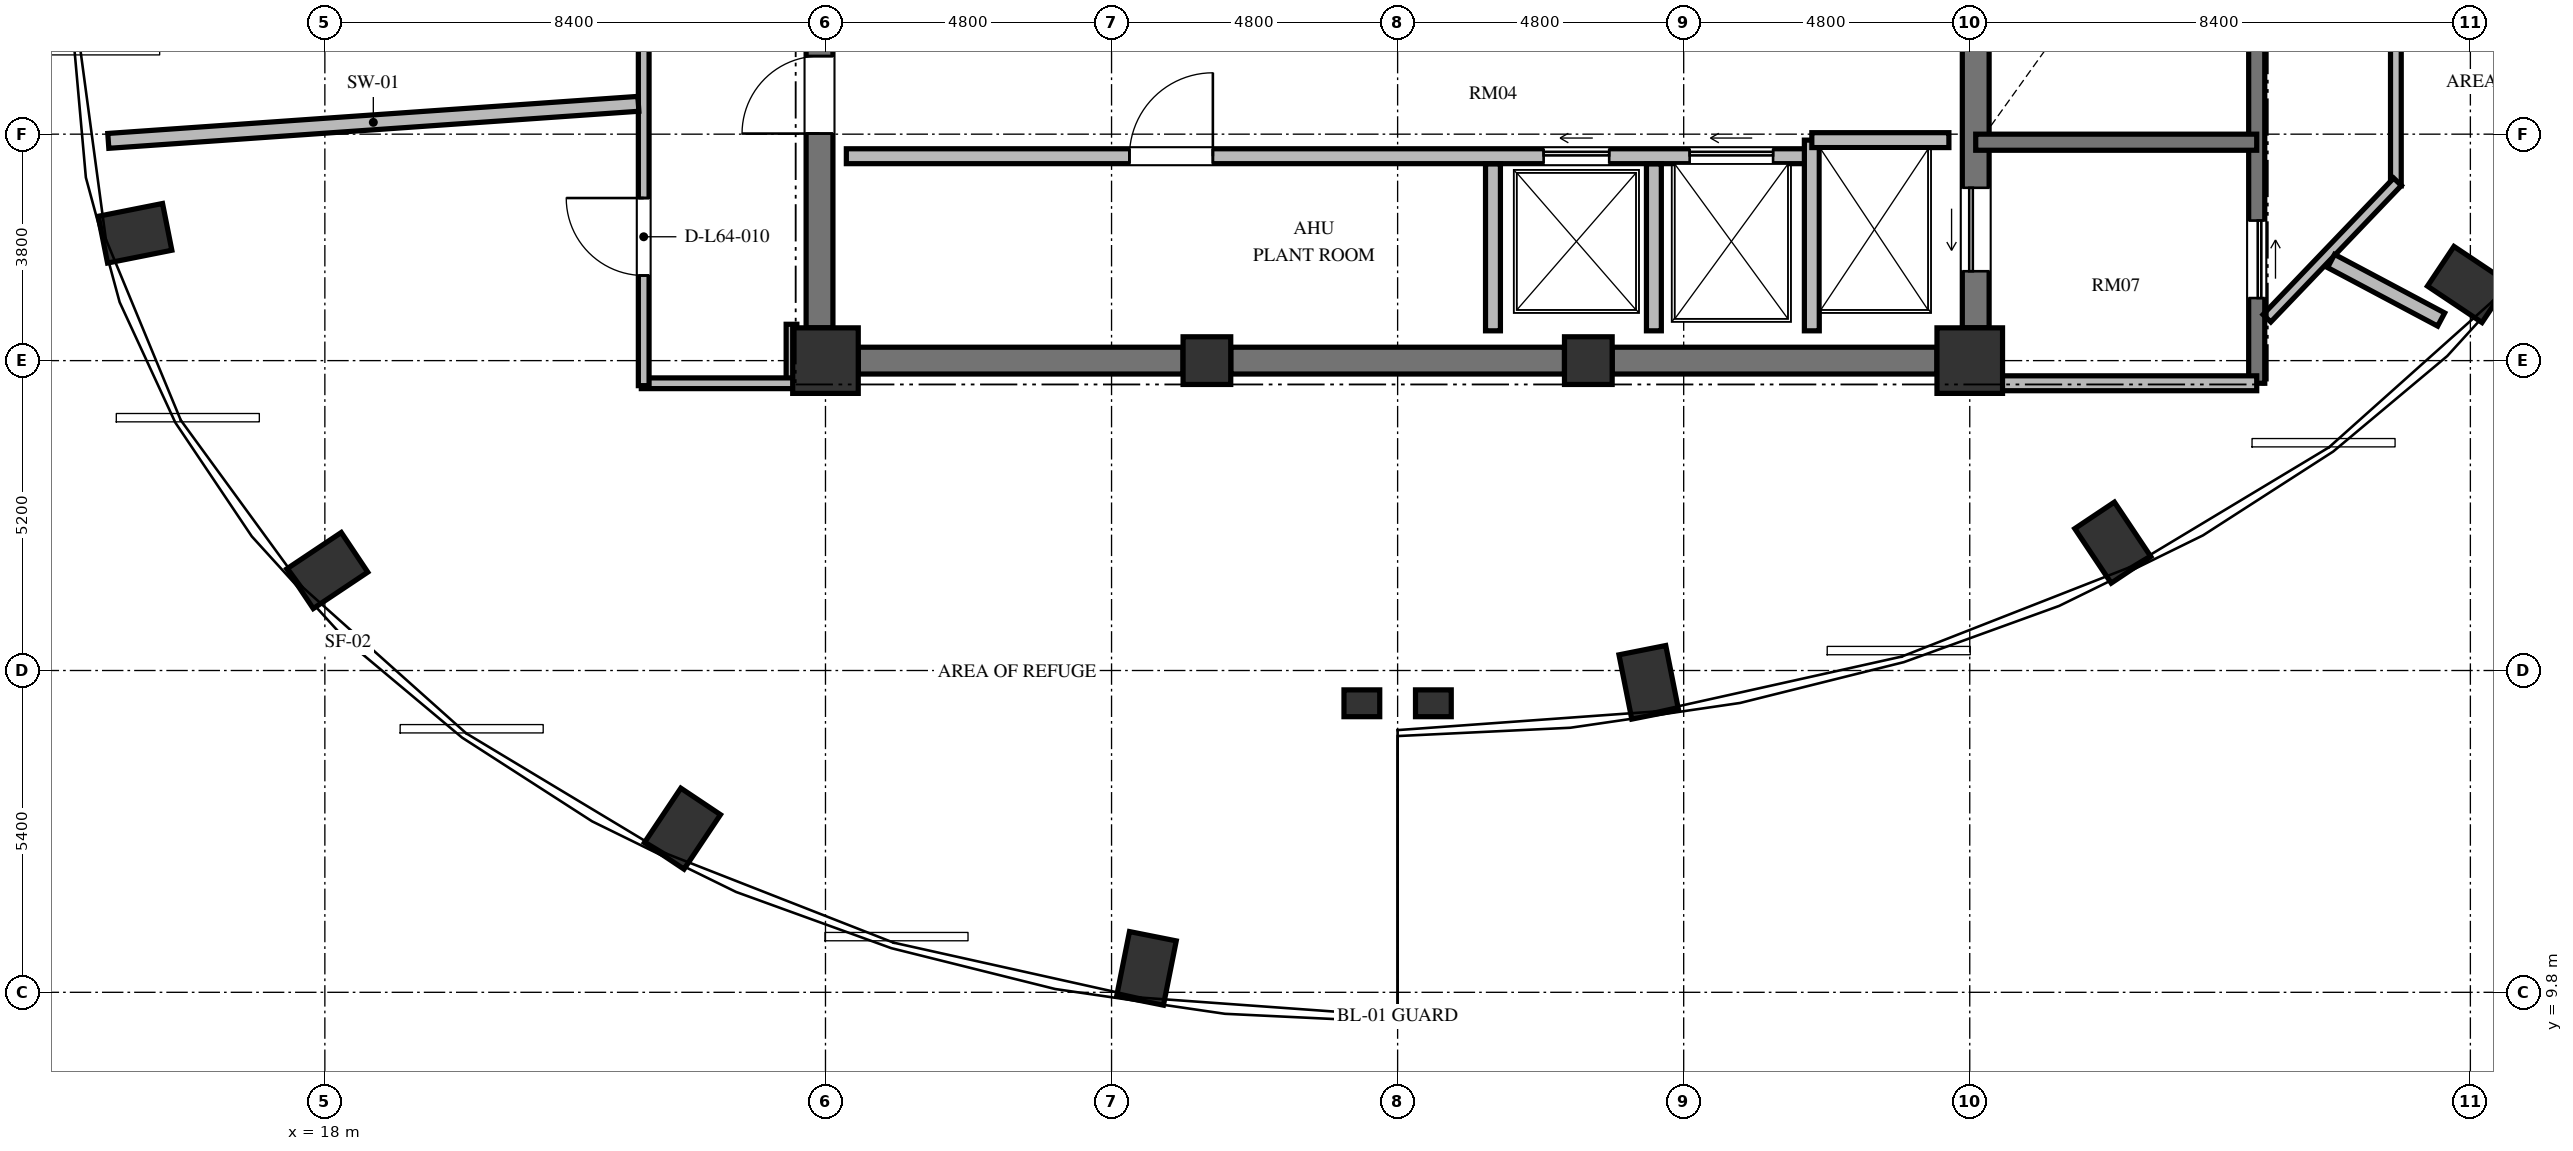
"""IFC4 building model, lengths in metres.
Left out: names, types, materials, properties, quantities, classifications, styles, units other than length and angle.
Written with IfcOpenShell. Run it as: python <this file> out.ifc"""

import sys

from ifc_helpers import new_model, si_unit, direction, frame, frame_2d, origin, origin_2d, place, context, subcontext, project, spatial, rectangle, extrude, element, fill, save


model = new_model("IFC4")
c1 = context("Model", 3, precision=1e-05, world=origin(), true_north=direction((0.0, 1.0)))
c2 = subcontext(c1, "Body", "Model", "MODEL_VIEW")
j1 = project(units=[si_unit("LENGTHUNIT", "METRE"), si_unit("PLANEANGLEUNIT", "RADIAN")], contexts=[c1])
p1 = place(None, origin())
s1 = spatial("IfcSite", under=j1, at=p1, CompositionType="ELEMENT")
p2 = place(p1, origin())
s2 = spatial("IfcBuilding", under=s1, at=p2, CompositionType="ELEMENT")
p3 = place(p2, frame((0.0, 0.0, 245.904)))
s3 = spatial("IfcBuildingStorey", under=s2, at=p3, CompositionType="ELEMENT", Elevation=245.904)
for number, where, z_axis, x_axis in (
    (1, (40.214, 15.002, 0.0), (0.0, 0.0, 1.0), (0.195, -0.981, 0.0)),
    (2, (48.0, 17.346, 0.0), (0.0, 0.0, 1.0), (0.556, -0.831, 0.0)),
    (3, (53.96, 21.677, 0.0), (0.0, 0.0, 1.0), (0.831, -0.556, 0.0)),
    (4, (14.815, 22.537, 0.0), (0.0, 0.0, 1.0), (-0.981, -0.195, 0.0)),
    (5, (18.04, 16.877, 0.0), (0.0, 0.0, 1.0), (-0.831, -0.556, 0.0)),
    (6, (24.0, 12.546, 0.0), (0.0, 0.0, 1.0), (-0.556, -0.831, 0.0)),
    (7, (31.786, 10.202, 0.0), (0.0, 0.0, 1.0), (-0.195, -0.981, 0.0)),
):
    element("IfcColumn", number, at=place(p3, frame(where, z_axis=z_axis, x_axis=x_axis)), inside=s3, PredefinedType="COLUMN", context=c2, shape_type="SweptSolid", body=[
        extrude(rectangle(XDim=1.1, YDim=0.8, at=origin_2d()), origin(), (0.0, 0.0, 1.0), 5.472),
    ])
p4 = place(p3, frame((26.4, 20.4, 0.0), z_axis=(0.0, 0.0, 1.0), x_axis=(1.0, 0.0, 0.0)))
e8 = element("IfcColumn", 8, at=p4, inside=s3, PredefinedType="COLUMN", context=c2, shape_type="SweptSolid", body=[
    extrude(rectangle(XDim=1.1, YDim=1.1, at=origin_2d()), origin(), (0.0, 0.0, 1.0), 5.472),
])
for number, where, z_axis, x_axis in (
    (9, (32.8, 20.4, 0.0), (0.0, 0.0, 1.0), (1.0, 0.0, 0.0)),
    (10, (39.2, 20.4, 0.0), (0.0, 0.0, 1.0), (1.0, 0.0, 0.0)),
):
    element("IfcColumn", number, at=place(p3, frame(where, z_axis=z_axis, x_axis=x_axis)), inside=s3, PredefinedType="COLUMN", context=c2, shape_type="SweptSolid", body=[
        extrude(rectangle(XDim=0.8, YDim=0.8, at=origin_2d()), origin(), (0.0, 0.0, 1.0), 5.472),
    ])
p5 = place(p3, frame((45.6, 20.4, 0.0), z_axis=(0.0, 0.0, 1.0), x_axis=(1.0, 0.0, 0.0)))
e11 = element("IfcColumn", 11, at=p5, inside=s3, PredefinedType="COLUMN", context=c2, shape_type="SweptSolid", body=[
    extrude(rectangle(XDim=1.1, YDim=1.1, at=origin_2d()), origin(), (0.0, 0.0, 1.0), 5.472),
])
for number, where, z_axis, x_axis in (
    (12, (35.4, 14.65, 0.0), (0.0, 0.0, 1.0), (1.0, 0.0, 0.0)),
    (13, (36.6, 14.65, 0.0), (0.0, 0.0, 1.0), (1.0, 0.0, 0.0)),
):
    element("IfcColumn", number, at=place(p3, frame(where, z_axis=z_axis, x_axis=x_axis)), inside=s3, PredefinedType="PILASTER", context=c2, shape_type="SweptSolid", body=[
        extrude(rectangle(XDim=0.6, YDim=0.45, at=origin_2d()), origin(), (0.0, 0.0, 1.0), 5.472),
    ])
p6 = place(p3, frame((26.3, 20.95, 0.0), z_axis=(0.0, 0.0, 1.0), x_axis=(0.0, 1.0, 0.0)))
e14 = element("IfcWall", 14, at=p6, inside=s3, PredefinedType="SHEAR", context=c2, shape_type="SweptSolid", body=[
    extrude(rectangle(XDim=14.1, YDim=0.45, at=frame_2d((7.05, 0.0))), origin(), (0.0, 0.0, 1.0), 5.472),
])
p7 = place(p6, frame((6.5, 0.0, 0.0)))
e15 = element("IfcOpeningElement", 15, at=p7, cuts=e14, PredefinedType="OPENING", context=c2, shape_type="SweptSolid", body=[
    extrude(rectangle(XDim=1.2, YDim=2.15, at=frame_2d((0.6, 1.075))), frame((0.0, 0.235, 0.0), z_axis=(0.0, -1.0, 0.0), x_axis=(1.0, 0.0, 0.0)), (0.0, 0.0, 1.0), 0.47),
])
p8 = place(p6, frame((9.6, 0.0, 0.0)))
e16 = element("IfcOpeningElement", 16, at=p8, cuts=e14, PredefinedType="OPENING", context=c2, shape_type="SweptSolid", body=[
    extrude(rectangle(XDim=1.3, YDim=2.2, at=frame_2d((0.65, 1.1))), frame((0.0, 0.235, 0.0), z_axis=(0.0, -1.0, 0.0), x_axis=(1.0, 0.0, 0.0)), (0.0, 0.0, 1.0), 0.47),
])
p9 = place(p6, frame((3.26, 0.0, 0.0)))
e17 = element("IfcOpeningElement", 17, at=p9, cuts=e14, PredefinedType="OPENING", context=c2, shape_type="SweptSolid", body=[
    extrude(rectangle(XDim=1.3, YDim=2.2, at=frame_2d((0.65, 1.1))), frame((0.0, 0.235, 0.0), z_axis=(0.0, -1.0, 0.0), x_axis=(1.0, 0.0, 0.0)), (0.0, 0.0, 1.0), 0.47),
])
p10 = place(p3, frame((45.7, 20.95, 0.0), z_axis=(0.0, 0.0, 1.0), x_axis=(0.0, 1.0, 0.0)))
e18 = element("IfcWall", 18, at=p10, inside=s3, PredefinedType="SHEAR", context=c2, shape_type="SweptSolid", body=[
    extrude(rectangle(XDim=14.1, YDim=0.45, at=frame_2d((7.05, 0.0))), origin(), (0.0, 0.0, 1.0), 5.472),
])
p11 = place(p10, frame((11.75, 0.0, 0.0)))
e19 = element("IfcOpeningElement", 19, at=p11, cuts=e18, PredefinedType="OPENING", context=c2, shape_type="SweptSolid", body=[
    extrude(rectangle(XDim=1.4, YDim=2.3, at=frame_2d((0.7, 1.15))), frame((0.0, 0.235, 0.0), z_axis=(0.0, -1.0, 0.0), x_axis=(1.0, 0.0, 0.0)), (0.0, 0.0, 1.0), 0.47),
])
p12 = place(p10, frame((0.95, 0.0, 0.0)))
e20 = element("IfcOpeningElement", 20, at=p12, cuts=e18, PredefinedType="OPENING", context=c2, shape_type="SweptSolid", body=[
    extrude(rectangle(XDim=1.4, YDim=2.3, at=frame_2d((0.7, 1.15))), frame((0.0, 0.235, 0.0), z_axis=(0.0, -1.0, 0.0), x_axis=(1.0, 0.0, 0.0)), (0.0, 0.0, 1.0), 0.47),
])
p13 = place(p3, frame((26.95, 20.4, 0.0), z_axis=(0.0, 0.0, 1.0), x_axis=(1.0, 0.0, 0.0)))
e21 = element("IfcWall", 21, at=p13, inside=s3, PredefinedType="SHEAR", context=c2, shape_type="SweptSolid", body=[
    extrude(rectangle(XDim=5.45, YDim=0.45, at=frame_2d((2.725, 0.0))), origin(), (0.0, 0.0, 1.0), 5.472),
])
p14 = place(p3, frame((33.2, 20.4, 0.0), z_axis=(0.0, 0.0, 1.0), x_axis=(1.0, 0.0, 0.0)))
e22 = element("IfcWall", 22, at=p14, inside=s3, PredefinedType="SHEAR", context=c2, shape_type="SweptSolid", body=[
    extrude(rectangle(XDim=5.6, YDim=0.45, at=frame_2d((2.8, 0.0))), origin(), (0.0, 0.0, 1.0), 5.472),
])
p15 = place(p3, frame((39.6, 20.4, 0.0), z_axis=(0.0, 0.0, 1.0), x_axis=(1.0, 0.0, 0.0)))
e23 = element("IfcWall", 23, at=p15, inside=s3, PredefinedType="SHEAR", context=c2, shape_type="SweptSolid", body=[
    extrude(rectangle(XDim=5.45, YDim=0.45, at=frame_2d((2.725, 0.0))), origin(), (0.0, 0.0, 1.0), 5.472),
])
p16 = place(p3, frame((26.75, 23.83, 0.0), z_axis=(0.0, 0.0, 1.0), x_axis=(1.0, 0.0, 0.0)))
e24 = element("IfcWall", 24, at=p16, inside=s3, PredefinedType="SOLIDWALL", context=c2, shape_type="SweptSolid", body=[
    extrude(rectangle(XDim=16.2, YDim=0.25, at=frame_2d((8.1, 0.0))), origin(), (0.0, 0.0, 1.0), 5.272),
])
p17 = place(p16, frame((4.75, 0.0, 0.0)))
e25 = element("IfcOpeningElement", 25, at=p17, cuts=e24, PredefinedType="OPENING", context=c2, shape_type="SweptSolid", body=[
    extrude(rectangle(XDim=1.4, YDim=2.2, at=frame_2d((0.7, 1.1))), frame((0.0, 0.135, 0.0), z_axis=(0.0, -1.0, 0.0), x_axis=(1.0, 0.0, 0.0)), (0.0, 0.0, 1.0), 0.27),
])
p18 = place(p16, frame((11.7, 0.0, 0.0)))
e26 = element("IfcOpeningElement", 26, at=p18, cuts=e24, PredefinedType="OPENING", context=c2, shape_type="SweptSolid", body=[
    extrude(rectangle(XDim=1.1, YDim=2.2, at=frame_2d((0.55, 1.1))), frame((0.0, 0.135, 0.0), z_axis=(0.0, -1.0, 0.0), x_axis=(1.0, 0.0, 0.0)), (0.0, 0.0, 1.0), 0.27),
])
p19 = place(p16, frame((14.15, 0.0, 0.0)))
e27 = element("IfcOpeningElement", 27, at=p19, cuts=e24, PredefinedType="OPENING", context=c2, shape_type="SweptSolid", body=[
    extrude(rectangle(XDim=1.4, YDim=2.3, at=frame_2d((0.7, 1.15))), frame((0.0, 0.135, 0.0), z_axis=(0.0, -1.0, 0.0), x_axis=(1.0, 0.0, 0.0)), (0.0, 0.0, 1.0), 0.27),
])
p20 = place(p3, frame((42.95, 20.9, 0.0), z_axis=(0.0, 0.0, 1.0), x_axis=(0.0, 1.0, 0.0)))
e28 = element("IfcWall", 28, at=p20, inside=s3, PredefinedType="SOLIDWALL", context=c2, shape_type="SweptSolid", body=[
    extrude(rectangle(XDim=3.2, YDim=0.25, at=frame_2d((1.6, 0.0))), origin(), (0.0, 0.0, 1.0), 5.272),
])
p21 = place(p3, frame((42.95, 24.1, 0.0), z_axis=(0.0, 0.0, 1.0), x_axis=(1.0, 0.0, 0.0)))
e29 = element("IfcWall", 29, at=p21, inside=s3, PredefinedType="SOLIDWALL", context=c2, shape_type="SweptSolid", body=[
    extrude(rectangle(XDim=2.3, YDim=0.25, at=frame_2d((1.15, 0.0))), origin(), (0.0, 0.0, 1.0), 5.272),
])
for number, where, z_axis, x_axis in (
    (30, (37.6, 20.9, 0.0), (0.0, 0.0, 1.0), (0.0, 1.0, 0.0)),
    (31, (40.3, 20.9, 0.0), (0.0, 0.0, 1.0), (0.0, 1.0, 0.0)),
):
    element("IfcWall", number, at=place(p3, frame(where, z_axis=z_axis, x_axis=x_axis)), inside=s3, PredefinedType="SOLIDWALL", context=c2, shape_type="SweptSolid", body=[
        extrude(rectangle(XDim=2.8, YDim=0.25, at=frame_2d((1.4, 0.0))), origin(), (0.0, 0.0, 1.0), 5.272),
    ])
p22 = place(p3, frame((50.415, 35.845, 0.0), z_axis=(0.0, 0.0, 1.0), x_axis=(0.0, -1.0, 0.0)))
e32 = element("IfcWall", 32, at=p22, inside=s3, PredefinedType="SHEAR", context=c2, shape_type="SweptSolid", body=[
    extrude(rectangle(XDim=15.825, YDim=0.27, at=frame_2d((7.913, 0.0))), origin(), (0.0, 0.0, 1.0), 5.472),
])
p23 = place(p22, frame((4.445, 0.0, 0.0)))
e33 = element("IfcOpeningElement", 33, at=p23, cuts=e32, PredefinedType="OPENING", context=c2, shape_type="SweptSolid", body=[
    extrude(rectangle(XDim=1.2, YDim=2.15, at=frame_2d((0.6, 1.075))), frame((0.0, 0.145, 0.0), z_axis=(0.0, -1.0, 0.0), x_axis=(1.0, 0.0, 0.0)), (0.0, 0.0, 1.0), 0.29),
])
p24 = place(p22, frame((1.295, 0.0, 0.0)))
e34 = element("IfcOpeningElement", 34, at=p24, cuts=e32, PredefinedType="OPENING", context=c2, shape_type="SweptSolid", body=[
    extrude(rectangle(XDim=1.3, YDim=2.2, at=frame_2d((0.65, 1.1))), frame((0.0, 0.145, 0.0), z_axis=(0.0, -1.0, 0.0), x_axis=(1.0, 0.0, 0.0)), (0.0, 0.0, 1.0), 0.29),
])
p25 = place(p22, frame((13.095, 0.0, 0.0)))
e35 = element("IfcOpeningElement", 35, at=p25, cuts=e32, PredefinedType="OPENING", context=c2, shape_type="SweptSolid", body=[
    extrude(rectangle(XDim=1.3, YDim=2.2, at=frame_2d((0.65, 1.1))), frame((0.0, 0.145, 0.0), z_axis=(0.0, -1.0, 0.0), x_axis=(1.0, 0.0, 0.0)), (0.0, 0.0, 1.0), 0.29),
])
p26 = place(p3, frame((45.7, 24.065, 0.0), z_axis=(0.0, 0.0, 1.0), x_axis=(1.0, 0.0, 0.0)))
e36 = element("IfcWall", 36, at=p26, inside=s3, PredefinedType="SHEAR", context=c2, shape_type="SweptSolid", body=[
    extrude(rectangle(XDim=4.715, YDim=0.27, at=frame_2d((2.357, 0.0))), origin(), (0.0, 0.0, 1.0), 5.472),
])
p27 = place(p3, frame((45.7, 20.02, 0.0), z_axis=(0.0, 0.0, 1.0), x_axis=(1.0, 0.0, 0.0)))
e37 = element("IfcWall", 37, at=p27, inside=s3, PredefinedType="SOLIDWALL", context=c2, shape_type="SweptSolid", body=[
    extrude(rectangle(XDim=4.715, YDim=0.25, at=frame_2d((2.357, 0.0))), origin(), (0.0, 0.0, 1.0), 5.272),
])
p28 = place(p3, frame((52.75, 37.468, 0.0), z_axis=(0.0, 0.0, 1.0), x_axis=(0.0, -1.0, 0.0)))
e38 = element("IfcWall", 38, at=p28, inside=s3, PredefinedType="PARTITIONING", context=c2, shape_type="SweptSolid", body=[
    extrude(rectangle(XDim=14.136, YDim=0.18, at=frame_2d((7.068, 0.0))), origin(), (0.0, 0.0, 1.0), 5.272),
])
p29 = place(p28, frame((10.407, 0.0, 0.0)))
e39 = element("IfcOpeningElement", 39, at=p29, cuts=e38, PredefinedType="OPENING", context=c2, shape_type="SweptSolid", body=[
    extrude(rectangle(XDim=1.3, YDim=2.2, at=frame_2d((0.65, 1.1))), frame((0.0, 0.1, 0.0), z_axis=(0.0, -1.0, 0.0), x_axis=(1.0, 0.0, 0.0)), (0.0, 0.0, 1.0), 0.2),
])
p30 = place(p28, frame((4.046, 0.0, 0.0)))
e40 = element("IfcOpeningElement", 40, at=p30, cuts=e38, PredefinedType="OPENING", context=c2, shape_type="SweptSolid", body=[
    extrude(rectangle(XDim=1.1, YDim=2.15, at=frame_2d((0.55, 1.075))), frame((0.0, 0.1, 0.0), z_axis=(0.0, -1.0, 0.0), x_axis=(1.0, 0.0, 0.0)), (0.0, 0.0, 1.0), 0.2),
])
p31 = place(p3, frame((52.778, 23.401, 0.0), z_axis=(0.0, 0.0, 1.0), x_axis=(-0.691338054195, -0.72253144902, 0.0)))
e41 = element("IfcWall", 41, at=p31, inside=s3, PredefinedType="PARTITIONING", context=c2, shape_type="SweptSolid", body=[
    extrude(rectangle(XDim=3.17, YDim=0.18, at=frame_2d((1.585, 0.0))), origin(), (0.0, 0.0, 1.0), 5.272),
])
p32 = place(p3, frame((25.83, 21.01, 0.0), z_axis=(0.0, 0.0, 1.0), x_axis=(0.0, -1.0, 0.0)))
e42 = element("IfcWall", 42, at=p32, inside=s3, PredefinedType="PARTITIONING", context=c2, shape_type="SweptSolid", body=[
    extrude(rectangle(XDim=1.03, YDim=0.18, at=frame_2d((0.515, 0.0))), origin(), (0.0, 0.0, 1.0), 5.272),
])
p33 = place(p3, frame((25.87, 20.02, 0.0), z_axis=(0.0, 0.0, 1.0), x_axis=(-1.0, 0.0, 0.0)))
e43 = element("IfcWall", 43, at=p33, inside=s3, PredefinedType="PARTITIONING", context=c2, shape_type="SweptSolid", body=[
    extrude(rectangle(XDim=2.56, YDim=0.18, at=frame_2d((1.28, 0.0))), origin(), (0.0, 0.0, 1.0), 5.272),
])
p34 = place(p3, frame((23.35, 19.98, 0.0), z_axis=(0.0, 0.0, 1.0), x_axis=(0.0, 1.0, 0.0)))
e44 = element("IfcWall", 44, at=p34, inside=s3, PredefinedType="PARTITIONING", context=c2, shape_type="SweptSolid", body=[
    extrude(rectangle(XDim=16.042, YDim=0.18, at=frame_2d((8.021, 0.0))), origin(), (0.0, 0.0, 1.0), 5.272),
])
p35 = place(p34, frame((1.848, 0.0, 0.0)))
e45 = element("IfcOpeningElement", 45, at=p35, cuts=e44, PredefinedType="OPENING", context=c2, shape_type="SweptSolid", body=[
    extrude(rectangle(XDim=1.3, YDim=2.2, at=frame_2d((0.65, 1.1))), frame((0.0, 0.1, 0.0), z_axis=(0.0, -1.0, 0.0), x_axis=(1.0, 0.0, 0.0)), (0.0, 0.0, 1.0), 0.2),
])
p36 = place(p34, frame((12.727, 0.0, 0.0)))
e46 = element("IfcOpeningElement", 46, at=p36, cuts=e44, PredefinedType="OPENING", context=c2, shape_type="SweptSolid", body=[
    extrude(rectangle(XDim=1.1, YDim=2.15, at=frame_2d((0.55, 1.075))), frame((0.0, 0.1, 0.0), z_axis=(0.0, -1.0, 0.0), x_axis=(1.0, 0.0, 0.0)), (0.0, 0.0, 1.0), 0.2),
])
p37 = place(p34, frame((7.094, 0.0, 0.0)))
e47 = element("IfcOpeningElement", 47, at=p37, cuts=e44, PredefinedType="OPENING", context=c2, shape_type="SweptSolid", body=[
    extrude(rectangle(XDim=1.3, YDim=2.2, at=frame_2d((0.65, 1.1))), frame((0.0, 0.1, 0.0), z_axis=(0.0, -1.0, 0.0), x_axis=(1.0, 0.0, 0.0)), (0.0, 0.0, 1.0), 0.2),
])
p38 = place(p3, frame((51.662, 22.072, 0.0), z_axis=(0.0, 0.0, 1.0), x_axis=(0.882994838887, -0.469382695143, 0.0)))
e48 = element("IfcWall", 48, at=p38, inside=s3, PredefinedType="SOLIDWALL", context=c2, shape_type="SweptSolid", body=[
    extrude(rectangle(XDim=2.093, YDim=0.25, at=frame_2d((1.046, 0.0))), origin(), (0.0, 0.0, 1.0), 5.272),
])
p39 = place(p3, frame((23.26, 24.709, 0.0), z_axis=(0.0, 0.0, 1.0), x_axis=(-0.997564743509, -0.069746559107, 0.0)))
e49 = element("IfcWall", 49, at=p39, inside=s3, PredefinedType="SOLIDWALL", context=c2, shape_type="SweptSolid", body=[
    extrude(rectangle(XDim=8.916, YDim=0.25, at=frame_2d((4.458, 0.0))), origin(), (0.0, 0.0, 1.0), 5.272),
])
p40 = place(p9, origin())
e50 = element("IfcDoor", 50, at=p40, inside=s3, OperationType="SINGLE_SWING_LEFT", PredefinedType="DOOR", context=c2, shape_type="SweptSolid", body=[
    extrude(rectangle(XDim=1.3, YDim=2.2, at=frame_2d((0.65, 1.1))), frame((0.0, 0.025, 0.0), z_axis=(0.0, -1.0, 0.0), x_axis=(1.0, 0.0, 0.0)), (0.0, 0.0, 1.0), 0.05),
])
fill(e17, e50)
p41 = place(p17, origin())
e51 = element("IfcDoor", 51, at=p41, inside=s3, OperationType="SINGLE_SWING_RIGHT", PredefinedType="DOOR", context=c2, shape_type="SweptSolid", body=[
    extrude(rectangle(XDim=1.4, YDim=2.2, at=frame_2d((0.7, 1.1))), frame((0.0, 0.025, 0.0), z_axis=(0.0, -1.0, 0.0), x_axis=(1.0, 0.0, 0.0)), (0.0, 0.0, 1.0), 0.05),
])
fill(e25, e51)
p42 = place(p18, origin())
e52 = element("IfcDoor", 52, at=p42, inside=s3, OperationType="SLIDING_TO_LEFT", PredefinedType="DOOR", context=c2, shape_type="SweptSolid", body=[
    extrude(rectangle(XDim=1.1, YDim=2.2, at=frame_2d((0.55, 1.1))), frame((0.0, 0.025, 0.0), z_axis=(0.0, -1.0, 0.0), x_axis=(1.0, 0.0, 0.0)), (0.0, 0.0, 1.0), 0.05),
])
fill(e26, e52)
p43 = place(p12, origin())
e53 = element("IfcDoor", 53, at=p43, inside=s3, OperationType="SLIDING_TO_LEFT", PredefinedType="DOOR", context=c2, shape_type="SweptSolid", body=[
    extrude(rectangle(XDim=1.4, YDim=2.3, at=frame_2d((0.7, 1.15))), frame((0.0, 0.025, 0.0), z_axis=(0.0, -1.0, 0.0), x_axis=(1.0, 0.0, 0.0)), (0.0, 0.0, 1.0), 0.05),
])
fill(e20, e53)
p44 = place(p19, origin())
e54 = element("IfcDoor", 54, at=p44, inside=s3, OperationType="SLIDING_TO_LEFT", PredefinedType="DOOR", context=c2, shape_type="SweptSolid", body=[
    extrude(rectangle(XDim=1.4, YDim=2.3, at=frame_2d((0.7, 1.15))), frame((0.0, 0.025, 0.0), z_axis=(0.0, -1.0, 0.0), x_axis=(1.0, 0.0, 0.0)), (0.0, 0.0, 1.0), 0.05),
])
fill(e27, e54)
p45 = place(p25, origin())
e55 = element("IfcDoor", 55, at=p45, inside=s3, OperationType="SLIDING_TO_LEFT", PredefinedType="DOOR", context=c2, shape_type="SweptSolid", body=[
    extrude(rectangle(XDim=1.3, YDim=2.2, at=frame_2d((0.65, 1.1))), frame((0.0, 0.025, 0.0), z_axis=(0.0, -1.0, 0.0), x_axis=(1.0, 0.0, 0.0)), (0.0, 0.0, 1.0), 0.05),
])
fill(e35, e55)
p46 = place(p35, origin())
e56 = element("IfcDoor", 56, at=p46, inside=s3, OperationType="SINGLE_SWING_RIGHT", PredefinedType="DOOR", context=c2, shape_type="SweptSolid", body=[
    extrude(rectangle(XDim=1.3, YDim=2.2, at=frame_2d((0.65, 1.1))), frame((0.0, 0.025, 0.0), z_axis=(0.0, -1.0, 0.0), x_axis=(1.0, 0.0, 0.0)), (0.0, 0.0, 1.0), 0.05),
])
fill(e45, e56)
save(model, sys.argv[1])
